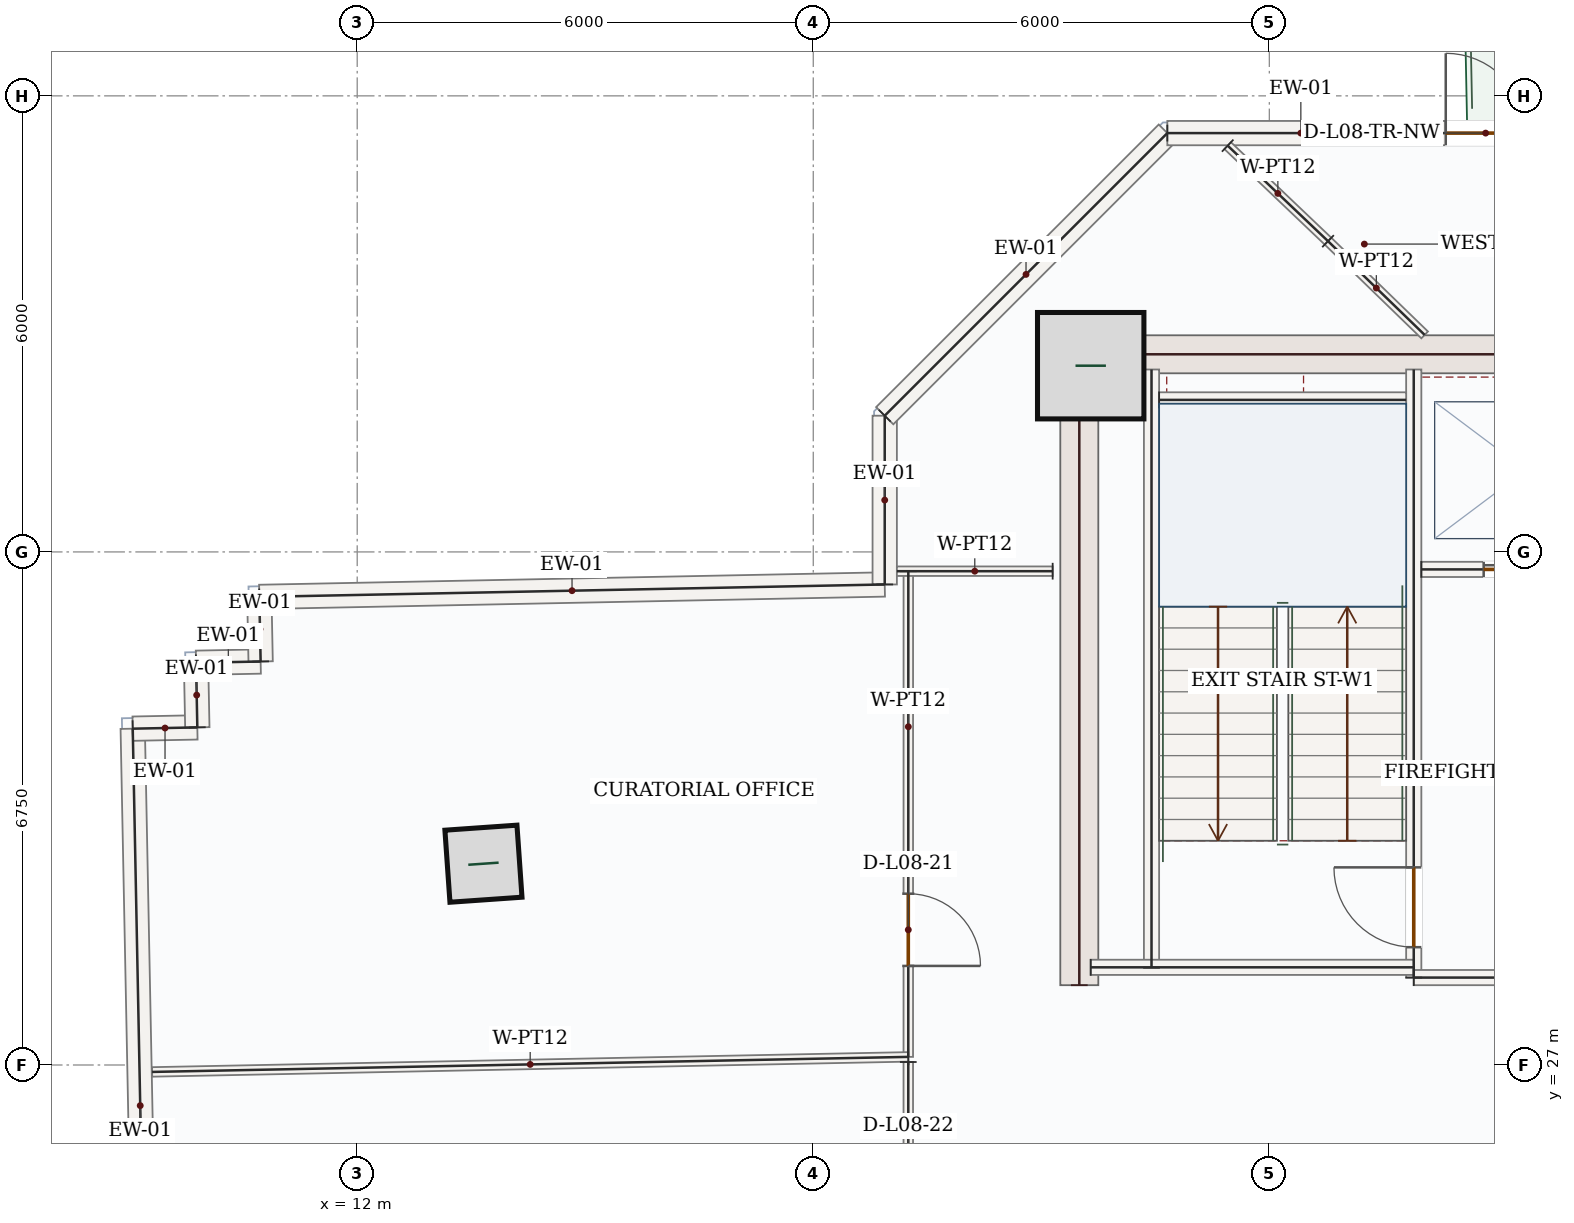
"""IFC4 building model, lengths in metres.
Left out: names, types, materials, properties, quantities, classifications, styles, units other than length and angle.
Written with IfcOpenShell. Run it as: python <this file> out.ifc"""

import sys

from ifc_helpers import new_model, si_unit, direction, frame, frame_2d, origin, origin_2d, place, context, subcontext, project, spatial, rectangle, hollow_rectangle, extrude, source, transform, mapped, element, fill, save


model = new_model("IFC4")
c1 = context("Model", 3, precision=1e-05, world=origin(), true_north=direction((0.0, 1.0)))
c2 = subcontext(c1, "Body", "Model", "MODEL_VIEW")
j1 = project(units=[si_unit("LENGTHUNIT", "METRE"), si_unit("PLANEANGLEUNIT", "RADIAN")], contexts=[c1])
p1 = place(None, origin())
s1 = spatial("IfcSite", under=j1, at=p1, CompositionType="ELEMENT")
p2 = place(p1, origin())
s2 = spatial("IfcBuilding", under=s1, at=p2, CompositionType="ELEMENT")
p3 = place(p2, frame((0.0, 0.0, 41.7)))
s3 = spatial("IfcBuildingStorey", under=s2, at=p3, CompositionType="ELEMENT", Elevation=41.7)
m1 = source(origin(), c2, "Body", "SweptSolid", [
    extrude(rectangle(XDim=8.55, YDim=0.5, at=frame_2d((4.275, 0.0))), origin(), (0.0, 0.0, 1.0), 3.95),
])
p4 = place(p3, frame((21.5, 28.05, 0.0), z_axis=(0.0, 0.0, 1.0), x_axis=(0.0, 1.0, 0.0)))
e1 = element("IfcWall", 1, at=p4, inside=s3, PredefinedType="SHEAR", context=c2, shape_type="MappedRepresentation", body=[
    mapped(m1, transform((0.0, 0.0, 0.0), x_axis=(1.0, 0.0, 0.0), y_axis=(0.0, 1.0, 0.0), z_axis=(0.0, 0.0, 1.0), scale=1.0)),
])
m2 = source(origin(), c2, "Body", "SweptSolid", [
    extrude(rectangle(XDim=7.0, YDim=0.5, at=frame_2d((3.5, 0.0))), origin(), (0.0, 0.0, 1.0), 3.95),
])
p5 = place(p3, frame((21.75, 36.35, 0.0), z_axis=(0.0, 0.0, 1.0), x_axis=(1.0, 0.0, 0.0)))
e2 = element("IfcWall", 2, at=p5, inside=s3, PredefinedType="SHEAR", context=c2, shape_type="MappedRepresentation", body=[
    mapped(m2, transform((0.0, 0.0, 0.0), x_axis=(1.0, 0.0, 0.0), y_axis=(0.0, 1.0, 0.0), z_axis=(0.0, 0.0, 1.0), scale=1.0)),
])
m3 = source(origin(), c2, "Body", "SweptSolid", [
    extrude(rectangle(XDim=1.4, YDim=1.4, at=origin_2d()), origin(), (0.0, 0.0, 1.0), 4.2),
])
p6 = place(p3, frame((21.65, 36.2, 0.0), z_axis=(0.0, 0.0, 1.0), x_axis=(1.0, 0.0, 0.0)))
e3 = element("IfcColumn", 3, at=p6, inside=s3, PredefinedType="COLUMN", context=c2, shape_type="MappedRepresentation", body=[
    mapped(m3, transform((0.0, 0.0, 0.0), x_axis=(1.0, 0.0, 0.0), y_axis=(0.0, 1.0, 0.0), z_axis=(0.0, 0.0, 1.0), scale=1.0)),
])
m4 = source(origin(), c2, "Body", "SweptSolid", [
    extrude(hollow_rectangle(XDim=0.95, YDim=0.95, WallThickness=0.05, at=origin_2d()), origin(), (0.0, 0.0, 1.0), 4.2),
])
p7 = place(p3, frame((13.661, 29.648, 0.0), z_axis=(0.0, 0.0, 1.0), x_axis=(0.99756405026, 0.069756473744, 0.0)))
e4 = element("IfcColumn", 4, at=p7, inside=s3, PredefinedType="COLUMN", context=c2, shape_type="MappedRepresentation", body=[
    mapped(m4, transform((0.0, 0.0, 0.0), x_axis=(1.0, 0.0, 0.0), y_axis=(0.0, 1.0, 0.0), z_axis=(0.0, 0.0, 1.0), scale=1.0)),
])
m5 = source(origin(), c2, "Body", "SweptSolid", [
    extrude(rectangle(XDim=9.92, YDim=0.32, at=frame_2d((4.96, 0.0))), origin(), (0.0, 0.0, 1.0), 3.95),
])
p8 = place(p3, frame((9.244, 21.507, 0.0), z_axis=(0.0, 0.0, 1.0), x_axis=(-0.019885787333, 0.99980225818, 0.0)))
e5 = element("IfcWall", 5, at=p8, inside=s3, PredefinedType="SOLIDWALL", context=c2, shape_type="MappedRepresentation", body=[
    mapped(m5, transform((0.0, 0.0, 0.0), x_axis=(1.0, 0.0, 0.0), y_axis=(0.0, 1.0, 0.0), z_axis=(0.0, 0.0, 1.0), scale=1.0)),
])
m6 = source(origin(), c2, "Body", "SweptSolid", [
    extrude(rectangle(XDim=0.85, YDim=0.32, at=frame_2d((0.425, 0.0))), origin(), (0.0, 0.0, 1.0), 3.95),
])
p9 = place(p3, frame((9.047, 31.425, 0.0), z_axis=(0.0, 0.0, 1.0), x_axis=(0.999803604205, 0.019817997326, 0.0)))
e6 = element("IfcWall", 6, at=p9, inside=s3, PredefinedType="SOLIDWALL", context=c2, shape_type="MappedRepresentation", body=[
    mapped(m6, transform((0.0, 0.0, 0.0), x_axis=(1.0, 0.0, 0.0), y_axis=(0.0, 1.0, 0.0), z_axis=(0.0, 0.0, 1.0), scale=1.0)),
])
m7 = source(origin(), c2, "Body", "SweptSolid", [
    extrude(rectangle(XDim=0.85, YDim=0.32, at=frame_2d((0.425, 0.0))), origin(), (0.0, 0.0, 1.0), 3.95),
])
p10 = place(p3, frame((9.896, 31.441, 0.0), z_axis=(0.0, 0.0, 1.0), x_axis=(-0.019812308004, 0.999803716962, 0.0)))
e7 = element("IfcWall", 7, at=p10, inside=s3, PredefinedType="SOLIDWALL", context=c2, shape_type="MappedRepresentation", body=[
    mapped(m7, transform((0.0, 0.0, 0.0), x_axis=(1.0, 0.0, 0.0), y_axis=(0.0, 1.0, 0.0), z_axis=(0.0, 0.0, 1.0), scale=1.0)),
])
for number, where, z_axis, x_axis in (
    (8, (9.88, 32.292, 0.0), (0.0, 0.0, 1.0), (1.0, 0.02, 0.0)),
    (9, (10.729, 32.308, 0.0), (0.0, 0.0, 1.0), (-0.02, 1.0, 0.0)),
):
    element("IfcWall", number, at=place(p3, frame(where, z_axis=z_axis, x_axis=x_axis)), inside=s3, PredefinedType="SOLIDWALL", context=c2, shape_type="MappedRepresentation", body=[
        mapped(m6, transform((0.0, 0.0, 0.0), x_axis=(1.0, 0.0, 0.0), y_axis=(0.0, 1.0, 0.0), z_axis=(0.0, 0.0, 1.0), scale=1.0)),
    ])
m8 = source(origin(), c2, "Body", "SweptSolid", [
    extrude(rectangle(XDim=8.229, YDim=0.32, at=frame_2d((4.115, 0.0))), origin(), (0.0, 0.0, 1.0), 3.95),
])
p11 = place(p3, frame((10.712, 33.158, 0.0), z_axis=(0.0, 0.0, 1.0), x_axis=(0.999801835372, 0.019907033577, 0.0)))
e10 = element("IfcWall", 10, at=p11, inside=s3, PredefinedType="SOLIDWALL", context=c2, shape_type="MappedRepresentation", body=[
    mapped(m8, transform((0.0, 0.0, 0.0), x_axis=(1.0, 0.0, 0.0), y_axis=(0.0, 1.0, 0.0), z_axis=(0.0, 0.0, 1.0), scale=1.0)),
])
m9 = source(origin(), c2, "Body", "SweptSolid", [
    extrude(rectangle(XDim=2.22, YDim=0.32, at=frame_2d((1.11, 0.0))), origin(), (0.0, 0.0, 1.0), 3.95),
])
p12 = place(p3, frame((18.94, 33.322, 0.0), z_axis=(0.0, 0.0, 1.0), x_axis=(0.0, 1.0, 0.0)))
e11 = element("IfcWall", 11, at=p12, inside=s3, PredefinedType="SOLIDWALL", context=c2, shape_type="MappedRepresentation", body=[
    mapped(m9, transform((0.0, 0.0, 0.0), x_axis=(1.0, 0.0, 0.0), y_axis=(0.0, 1.0, 0.0), z_axis=(0.0, 0.0, 1.0), scale=1.0)),
])
m10 = source(origin(), c2, "Body", "SweptSolid", [
    extrude(rectangle(XDim=5.258, YDim=0.32, at=frame_2d((2.629, 0.0))), origin(), (0.0, 0.0, 1.0), 3.95),
])
p13 = place(p3, frame((18.94, 35.542, 0.0), z_axis=(0.0, 0.0, 1.0), x_axis=(0.707106781187, 0.707106781187, 0.0)))
e12 = element("IfcWall", 12, at=p13, inside=s3, PredefinedType="SOLIDWALL", context=c2, shape_type="MappedRepresentation", body=[
    mapped(m10, transform((0.0, 0.0, 0.0), x_axis=(1.0, 0.0, 0.0), y_axis=(0.0, 1.0, 0.0), z_axis=(0.0, 0.0, 1.0), scale=1.0)),
])
p14 = place(p3, frame((22.658, 39.26, 0.0), z_axis=(0.0, 0.0, 1.0), x_axis=(1.0, 0.0, 0.0)))
e13 = element("IfcWall", 13, at=p14, inside=s3, PredefinedType="SOLIDWALL", context=c2, shape_type="SweptSolid", body=[
    extrude(rectangle(XDim=6.437, YDim=0.32, at=frame_2d((3.218, 0.0))), origin(), (0.0, 0.0, 1.0), 3.95),
])
p15 = place(p14, frame((3.663, 0.0, 0.0)))
e14 = element("IfcOpeningElement", 14, at=p15, cuts=e13, PredefinedType="OPENING", context=c2, shape_type="SweptSolid", body=[
    extrude(rectangle(XDim=1.05, YDim=2.15, at=frame_2d((0.525, 1.075))), frame((0.0, 0.17, 0.0), z_axis=(0.0, -1.0, 0.0), x_axis=(1.0, 0.0, 0.0)), (0.0, 0.0, 1.0), 0.34),
])
m11 = source(origin(), c2, "Body", "SweptSolid", [
    extrude(rectangle(XDim=7.87, YDim=0.2, at=frame_2d((3.935, 0.0))), origin(), (0.0, 0.0, 1.0), 3.95),
])
p16 = place(p3, frame((22.45, 28.28, 0.0), z_axis=(0.0, 0.0, 1.0), x_axis=(0.0, 1.0, 0.0)))
e15 = element("IfcWall", 15, at=p16, inside=s3, PredefinedType="SOLIDWALL", context=c2, shape_type="MappedRepresentation", body=[
    mapped(m11, transform((0.0, 0.0, 0.0), x_axis=(1.0, 0.0, 0.0), y_axis=(0.0, 1.0, 0.0), z_axis=(0.0, 0.0, 1.0), scale=1.0)),
])
p17 = place(p3, frame((25.9, 28.15, 0.0), z_axis=(0.0, 0.0, 1.0), x_axis=(0.0, 1.0, 0.0)))
e16 = element("IfcWall", 16, at=p17, inside=s3, PredefinedType="SOLIDWALL", context=c2, shape_type="SweptSolid", body=[
    extrude(rectangle(XDim=8.0, YDim=0.2, at=frame_2d((4.0, 0.0))), origin(), (0.0, 0.0, 1.0), 3.95),
])
p18 = place(p17, frame((0.4, 0.0, 0.0)))
e17 = element("IfcOpeningElement", 17, at=p18, cuts=e16, PredefinedType="OPENING", context=c2, shape_type="SweptSolid", body=[
    extrude(rectangle(XDim=1.05, YDim=2.15, at=frame_2d((0.525, 1.075))), frame((0.0, 0.11, 0.0), z_axis=(0.0, -1.0, 0.0), x_axis=(1.0, 0.0, 0.0)), (0.0, 0.0, 1.0), 0.22),
])
m12 = source(origin(), c2, "Body", "SweptSolid", [
    extrude(rectangle(XDim=4.25, YDim=0.2, at=frame_2d((2.125, 0.0))), origin(), (0.0, 0.0, 1.0), 3.95),
])
p19 = place(p3, frame((21.65, 28.285, 0.0), z_axis=(0.0, 0.0, 1.0), x_axis=(1.0, 0.0, 0.0)))
e18 = element("IfcWall", 18, at=p19, inside=s3, PredefinedType="SOLIDWALL", context=c2, shape_type="MappedRepresentation", body=[
    mapped(m12, transform((0.0, 0.0, 0.0), x_axis=(1.0, 0.0, 0.0), y_axis=(0.0, 1.0, 0.0), z_axis=(0.0, 0.0, 1.0), scale=1.0)),
])
m13 = source(origin(), c2, "Body", "SweptSolid", [
    extrude(rectangle(XDim=3.0, YDim=0.2, at=frame_2d((1.5, 0.0))), origin(), (0.0, 0.0, 1.0), 3.95),
])
p20 = place(p3, frame((25.9, 28.15, 0.0), z_axis=(0.0, 0.0, 1.0), x_axis=(1.0, 0.0, 0.0)))
e19 = element("IfcWall", 19, at=p20, inside=s3, PredefinedType="SOLIDWALL", context=c2, shape_type="MappedRepresentation", body=[
    mapped(m13, transform((0.0, 0.0, 0.0), x_axis=(1.0, 0.0, 0.0), y_axis=(0.0, 1.0, 0.0), z_axis=(0.0, 0.0, 1.0), scale=1.0)),
])
m14 = source(origin(), c2, "Body", "SweptSolid", [
    extrude(rectangle(XDim=3.25, YDim=0.2, at=frame_2d((1.625, 0.0))), origin(), (0.0, 0.0, 1.0), 3.95),
])
p21 = place(p3, frame((22.55, 35.75, 0.0), z_axis=(0.0, 0.0, 1.0), x_axis=(1.0, 0.0, 0.0)))
e20 = element("IfcWall", 20, at=p21, inside=s3, PredefinedType="SOLIDWALL", context=c2, shape_type="MappedRepresentation", body=[
    mapped(m14, transform((0.0, 0.0, 0.0), x_axis=(1.0, 0.0, 0.0), y_axis=(0.0, 1.0, 0.0), z_axis=(0.0, 0.0, 1.0), scale=1.0)),
])
p22 = place(p3, frame((26.0, 33.52, 0.0), z_axis=(0.0, 0.0, 1.0), x_axis=(1.0, 0.0, 0.0)))
e21 = element("IfcWall", 21, at=p22, inside=s3, PredefinedType="SOLIDWALL", context=c2, shape_type="SweptSolid", body=[
    extrude(rectangle(XDim=2.75, YDim=0.2, at=frame_2d((1.375, 0.0))), origin(), (0.0, 0.0, 1.0), 3.95),
])
p23 = place(p22, frame((0.82, 0.0, 0.0)))
e22 = element("IfcOpeningElement", 22, at=p23, cuts=e21, PredefinedType="OPENING", context=c2, shape_type="SweptSolid", body=[
    extrude(rectangle(XDim=1.1, YDim=2.15, at=frame_2d((0.55, 1.075))), frame((0.0, 0.11, 0.0), z_axis=(0.0, -1.0, 0.0), x_axis=(1.0, 0.0, 0.0)), (0.0, 0.0, 1.0), 0.22),
])
p24 = place(p3, frame((19.25, 33.496, 0.0), z_axis=(0.0, 0.0, 1.0), x_axis=(-7.6417545e-05, -0.99999999708, 0.0)))
e23 = element("IfcWall", 23, at=p24, inside=s3, PredefinedType="PARTITIONING", context=c2, shape_type="SweptSolid", body=[
    extrude(rectangle(XDim=6.39, YDim=0.125, at=frame_2d((3.195, 0.0))), origin(), (0.0, 0.0, 1.0), 3.95),
])
p25 = place(p24, frame((4.243, 0.0, 0.0)))
e24 = element("IfcOpeningElement", 24, at=p25, cuts=e23, PredefinedType="OPENING", context=c2, shape_type="SweptSolid", body=[
    extrude(rectangle(XDim=0.95, YDim=2.15, at=frame_2d((0.475, 1.075))), frame((0.0, 0.073, 0.0), z_axis=(0.0, -1.0, 0.0), x_axis=(1.0, 0.0, 0.0)), (0.0, 0.0, 1.0), 0.145),
])
m15 = source(origin(), c2, "Body", "SweptSolid", [
    extrude(rectangle(XDim=9.95, YDim=0.125, at=frame_2d((4.975, 0.0))), origin(), (0.0, 0.0, 1.0), 3.95),
])
p26 = place(p3, frame((19.25, 27.107, 0.0), z_axis=(0.0, 0.0, 1.0), x_axis=(-0.999802007469, -0.019898388379, 0.0)))
e25 = element("IfcWall", 25, at=p26, inside=s3, PredefinedType="PARTITIONING", context=c2, shape_type="MappedRepresentation", body=[
    mapped(m15, transform((0.0, 0.0, 0.0), x_axis=(1.0, 0.0, 0.0), y_axis=(0.0, 1.0, 0.0), z_axis=(0.0, 0.0, 1.0), scale=1.0)),
])
m16 = source(origin(), c2, "Body", "SweptSolid", [
    extrude(rectangle(XDim=1.823, YDim=0.125, at=frame_2d((0.911, 0.0))), origin(), (0.0, 0.0, 1.0), 3.95),
])
p27 = place(p3, frame((23.452, 39.095, 0.0), z_axis=(0.0, 0.0, 1.0), x_axis=(0.724303533388, -0.689481248129, 0.0)))
e26 = element("IfcWall", 26, at=p27, inside=s3, PredefinedType="PARTITIONING", context=c2, shape_type="MappedRepresentation", body=[
    mapped(m16, transform((0.0, 0.0, 0.0), x_axis=(1.0, 0.0, 0.0), y_axis=(0.0, 1.0, 0.0), z_axis=(0.0, 0.0, 1.0), scale=1.0)),
])
m17 = source(origin(), c2, "Body", "SweptSolid", [
    extrude(rectangle(XDim=1.771, YDim=0.125, at=frame_2d((0.885, 0.0))), origin(), (0.0, 0.0, 1.0), 3.95),
])
p28 = place(p3, frame((24.772, 37.838, 0.0), z_axis=(0.0, 0.0, 1.0), x_axis=(0.717777212316, -0.696272844135, 0.0)))
e27 = element("IfcWall", 27, at=p28, inside=s3, PredefinedType="PARTITIONING", context=c2, shape_type="MappedRepresentation", body=[
    mapped(m17, transform((0.0, 0.0, 0.0), x_axis=(1.0, 0.0, 0.0), y_axis=(0.0, 1.0, 0.0), z_axis=(0.0, 0.0, 1.0), scale=1.0)),
])
m18 = source(origin(), c2, "Body", "SweptSolid", [
    extrude(rectangle(XDim=2.049, YDim=0.125, at=frame_2d((1.025, 0.0))), origin(), (0.0, 0.0, 1.0), 3.95),
])
p29 = place(p3, frame((21.149, 33.497, 0.0), z_axis=(0.0, 0.0, 1.0), x_axis=(-0.999999992904, -0.000119132713, 0.0)))
e28 = element("IfcWall", 28, at=p29, inside=s3, PredefinedType="PARTITIONING", context=c2, shape_type="MappedRepresentation", body=[
    mapped(m18, transform((0.0, 0.0, 0.0), x_axis=(1.0, 0.0, 0.0), y_axis=(0.0, 1.0, 0.0), z_axis=(0.0, 0.0, 1.0), scale=1.0)),
])
p30 = place(p3, frame((19.25, 27.039, 0.0), z_axis=(0.0, 0.0, 1.0), x_axis=(0.0, -1.0, 0.0)))
e29 = element("IfcWall", 29, at=p30, inside=s3, PredefinedType="PARTITIONING", context=c2, shape_type="SweptSolid", body=[
    extrude(rectangle(XDim=6.533, YDim=0.125, at=frame_2d((3.267, 0.0))), origin(), (0.0, 0.0, 1.0), 3.95),
])
p31 = place(p30, frame((1.228, 0.0, 0.0)))
e30 = element("IfcOpeningElement", 30, at=p31, cuts=e29, PredefinedType="OPENING", context=c2, shape_type="SweptSolid", body=[
    extrude(rectangle(XDim=0.95, YDim=2.15, at=frame_2d((0.475, 1.075))), frame((0.0, 0.073, 0.0), z_axis=(0.0, -1.0, 0.0), x_axis=(1.0, 0.0, 0.0)), (0.0, 0.0, 1.0), 0.145),
])
m19 = source(origin(), c2, "Body", "SweptSolid", [
    extrude(rectangle(XDim=1.05, YDim=2.15, at=frame_2d((0.525, 1.075))), frame((0.0, 0.025, 0.0), z_axis=(0.0, -1.0, 0.0), x_axis=(1.0, 0.0, 0.0)), (0.0, 0.0, 1.0), 0.05),
])
p32 = place(p15, origin())
e31 = element("IfcDoor", 31, at=p32, inside=s3, OperationType="SINGLE_SWING_LEFT", PredefinedType="DOOR", context=c2, shape_type="MappedRepresentation", body=[
    mapped(m19, transform((0.0, 0.0, 0.0), x_axis=(1.0, 0.0, 0.0), y_axis=(0.0, 1.0, 0.0), z_axis=(0.0, 0.0, 1.0), scale=1.0)),
])
fill(e14, e31)
p33 = place(p18, origin())
e32 = element("IfcDoor", 32, at=p33, inside=s3, OperationType="SINGLE_SWING_RIGHT", PredefinedType="DOOR", context=c2, shape_type="MappedRepresentation", body=[
    mapped(m19, transform((0.0, 0.0, 0.0), x_axis=(1.0, 0.0, 0.0), y_axis=(0.0, 1.0, 0.0), z_axis=(0.0, 0.0, 1.0), scale=1.0)),
])
fill(e17, e32)
m20 = source(origin(), c2, "Body", "SweptSolid", [
    extrude(rectangle(XDim=1.1, YDim=2.15, at=frame_2d((0.55, 1.075))), frame((0.0, 0.025, 0.0), z_axis=(0.0, -1.0, 0.0), x_axis=(1.0, 0.0, 0.0)), (0.0, 0.0, 1.0), 0.05),
])
p34 = place(p23, origin())
e33 = element("IfcDoor", 33, at=p34, inside=s3, OperationType="DOUBLE_DOOR_SLIDING", PredefinedType="DOOR", context=c2, shape_type="MappedRepresentation", body=[
    mapped(m20, transform((0.0, 0.0, 0.0), x_axis=(1.0, 0.0, 0.0), y_axis=(0.0, 1.0, 0.0), z_axis=(0.0, 0.0, 1.0), scale=1.0)),
])
fill(e22, e33)
m21 = source(origin(), c2, "Body", "SweptSolid", [
    extrude(rectangle(XDim=0.95, YDim=2.15, at=frame_2d((0.475, 1.075))), frame((0.0, 0.025, 0.0), z_axis=(0.0, -1.0, 0.0), x_axis=(1.0, 0.0, 0.0)), (0.0, 0.0, 1.0), 0.05),
])
p35 = place(p25, origin())
e34 = element("IfcDoor", 34, at=p35, inside=s3, OperationType="SINGLE_SWING_RIGHT", PredefinedType="DOOR", context=c2, shape_type="MappedRepresentation", body=[
    mapped(m21, transform((0.0, 0.0, 0.0), x_axis=(1.0, 0.0, 0.0), y_axis=(0.0, 1.0, 0.0), z_axis=(0.0, 0.0, 1.0), scale=1.0)),
])
fill(e24, e34)
save(model, sys.argv[1])
